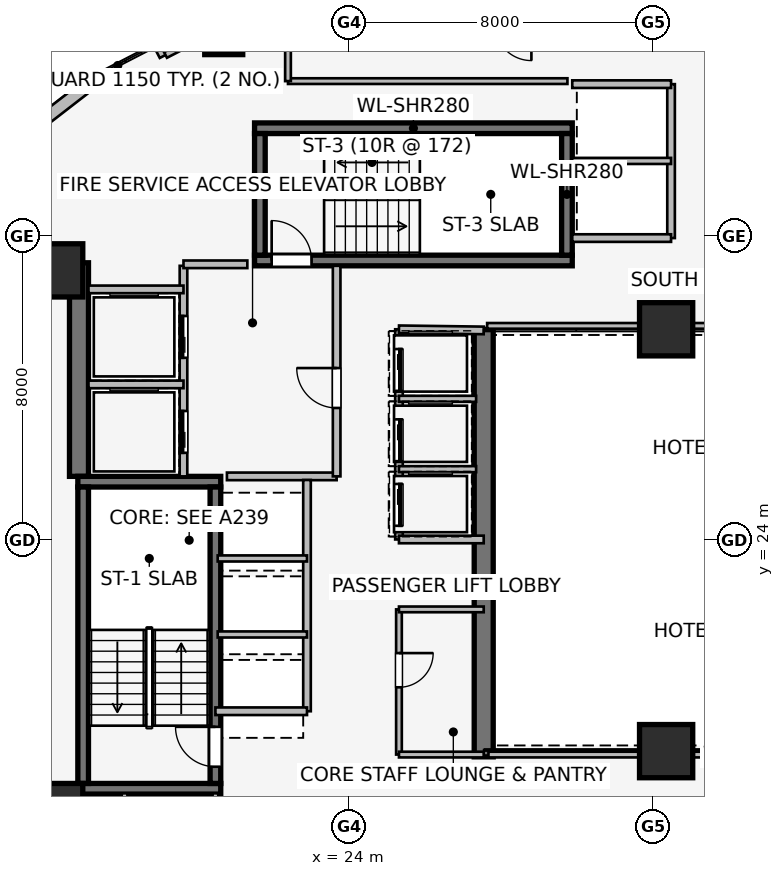
"""IFC4 building model, lengths in metres.
Left out: names, types, materials, properties, quantities, classifications, styles, units other than length and angle.
Written with IfcOpenShell. Run it as: python <this file> out.ifc"""

import sys

from ifc_helpers import new_model, si_unit, direction, frame, frame_2d, origin, origin_2d, place, context, subcontext, project, spatial, rectangle, extrude, element, fill, save


model = new_model("IFC4")
c1 = context("Model", 3, precision=1e-05, world=origin(), true_north=direction((0.0, 1.0)))
c2 = subcontext(c1, "Body", "Model", "MODEL_VIEW")
j1 = project(units=[si_unit("LENGTHUNIT", "METRE"), si_unit("PLANEANGLEUNIT", "RADIAN")], contexts=[c1])
p1 = place(None, origin())
s1 = spatial("IfcSite", under=j1, at=p1, CompositionType="ELEMENT")
p2 = place(p1, origin())
s2 = spatial("IfcBuilding", under=s1, at=p2, CompositionType="ELEMENT")
p3 = place(p2, frame((0.0, 0.0, 139.5)))
s3 = spatial("IfcBuildingStorey", under=s2, at=p3, CompositionType="ELEMENT", Elevation=139.5)
p4 = place(p3, frame((16.9, 25.68, 0.0), z_axis=(0.0, 0.0, 1.0), x_axis=(0.0, 1.0, 0.0)))
e1 = element("IfcWall", 1, at=p4, inside=s3, PredefinedType="SHEAR", context=c2, shape_type="SweptSolid", body=[
    extrude(rectangle(XDim=5.62, YDim=0.5, at=frame_2d((2.81, 0.0))), origin(), (0.0, 0.0, 1.0), 3.45),
])
p5 = place(p3, frame((27.55, 29.55, 0.0), z_axis=(0.0, 0.0, 1.0), x_axis=(0.0, -1.0, 0.0)))
e2 = element("IfcWall", 2, at=p5, inside=s3, PredefinedType="SHEAR", context=c2, shape_type="SweptSolid", body=[
    extrude(rectangle(XDim=11.25, YDim=0.5, at=frame_2d((5.625, 0.0))), origin(), (0.0, 0.0, 1.0), 3.45),
])
for number, where, z_axis, x_axis in (
    (3, (16.87, 17.46, 0.0), (0.0, 0.0, 1.0), (1.0, 0.0, 0.0)),
    (4, (20.63, 25.54, 0.0), (0.0, 0.0, 1.0), (-1.0, 0.0, 0.0)),
):
    element("IfcWall", number, at=place(p3, frame(where, z_axis=z_axis, x_axis=x_axis)), inside=s3, PredefinedType="SHEAR", context=c2, shape_type="SweptSolid", body=[
        extrude(rectangle(XDim=3.76, YDim=0.28, at=frame_2d((1.88, 0.0))), origin(), (0.0, 0.0, 1.0), 3.45),
    ])
p6 = place(p3, frame((17.01, 25.4, 0.0), z_axis=(0.0, 0.0, 1.0), x_axis=(0.0, -1.0, 0.0)))
e5 = element("IfcWall", 5, at=p6, inside=s3, PredefinedType="SHEAR", context=c2, shape_type="SweptSolid", body=[
    extrude(rectangle(XDim=7.8, YDim=0.28, at=frame_2d((3.9, 0.0))), origin(), (0.0, 0.0, 1.0), 3.45),
])
p7 = place(p3, frame((20.49, 17.6, 0.0), z_axis=(0.0, 0.0, 1.0), x_axis=(0.0, 1.0, 0.0)))
e6 = element("IfcWall", 6, at=p7, inside=s3, PredefinedType="SHEAR", context=c2, shape_type="SweptSolid", body=[
    extrude(rectangle(XDim=7.8, YDim=0.28, at=frame_2d((3.9, 0.0))), origin(), (0.0, 0.0, 1.0), 3.45),
])
p8 = place(p7, frame((0.44, 0.0, 0.0)))
e7 = element("IfcOpeningElement", 7, at=p8, cuts=e6, PredefinedType="OPENING", context=c2, shape_type="SweptSolid", body=[
    extrude(rectangle(XDim=1.05, YDim=2.0, at=frame_2d((0.525, 1.0))), frame((0.0, 0.15, 0.0), z_axis=(0.0, -1.0, 0.0), x_axis=(1.0, 0.0, 0.0)), (0.0, 0.0, 1.0), 0.3),
])
p9 = place(p3, frame((21.52, 31.36, 0.0), z_axis=(0.0, 0.0, 1.0), x_axis=(1.0, 0.0, 0.0)))
e8 = element("IfcWall", 8, at=p9, inside=s3, PredefinedType="SHEAR", context=c2, shape_type="SweptSolid", body=[
    extrude(rectangle(XDim=8.36, YDim=0.28, at=frame_2d((4.18, 0.0))), origin(), (0.0, 0.0, 1.0), 3.45),
])
p10 = place(p9, frame((0.45, 0.0, 0.0)))
e9 = element("IfcOpeningElement", 9, at=p10, cuts=e8, PredefinedType="OPENING", context=c2, shape_type="SweptSolid", body=[
    extrude(rectangle(XDim=1.05, YDim=2.0, at=frame_2d((0.525, 1.0))), frame((0.0, 0.15, 0.0), z_axis=(0.0, -1.0, 0.0), x_axis=(1.0, 0.0, 0.0)), (0.0, 0.0, 1.0), 0.3),
])
p11 = place(p3, frame((29.88, 34.84, 0.0), z_axis=(0.0, 0.0, 1.0), x_axis=(-1.0, 0.0, 0.0)))
e10 = element("IfcWall", 10, at=p11, inside=s3, PredefinedType="SHEAR", context=c2, shape_type="SweptSolid", body=[
    extrude(rectangle(XDim=8.36, YDim=0.28, at=frame_2d((4.18, 0.0))), origin(), (0.0, 0.0, 1.0), 3.45),
])
for number, where, z_axis, x_axis in (
    (11, (21.66, 34.7, 0.0), (0.0, 0.0, 1.0), (0.0, -1.0, 0.0)),
    (12, (29.74, 31.5, 0.0), (0.0, 0.0, 1.0), (0.0, 1.0, 0.0)),
):
    element("IfcWall", number, at=place(p3, frame(where, z_axis=z_axis, x_axis=x_axis)), inside=s3, PredefinedType="SHEAR", context=c2, shape_type="SweptSolid", body=[
        extrude(rectangle(XDim=3.2, YDim=0.28, at=frame_2d((1.6, 0.0))), origin(), (0.0, 0.0, 1.0), 3.45),
    ])
for number, where, z_axis, x_axis in (
    (13, (16.3, 16.9, 0.0), (0.0, 0.0, 1.0), (1.0, 0.0, 0.0)),
    (14, (16.3, 31.1, 0.0), (0.0, 0.0, 1.0), (1.0, 0.0, 0.0)),
    (15, (32.35, 18.45, 0.0), (0.0, 0.0, 1.0), (1.0, 0.0, 0.0)),
    (16, (32.35, 29.55, 0.0), (0.0, 0.0, 1.0), (1.0, 0.0, 0.0)),
):
    element("IfcColumn", number, at=place(p3, frame(where, z_axis=z_axis, x_axis=x_axis)), inside=s3, PredefinedType="COLUMN", context=c2, shape_type="SweptSolid", body=[
        extrude(rectangle(XDim=1.4, YDim=1.4, at=origin_2d()), origin(), (0.0, 0.0, 1.0), 3.45),
    ])
p12 = place(p3, frame((20.709, 37.277, 0.0), z_axis=(0.0, 0.0, 1.0), x_axis=(1.0, 0.0, 0.0)))
e17 = element("IfcColumn", 17, at=p12, inside=s3, PredefinedType="COLUMN", context=c2, shape_type="SweptSolid", body=[
    extrude(rectangle(XDim=1.0, YDim=1.0, at=origin_2d()), origin(), (0.0, 0.0, 1.0), 3.45),
])
p13 = place(p3, frame((19.177, 36.767, 0.0), z_axis=(0.0, 0.0, 1.0), x_axis=(-0.458658947762, 0.88861238436, 0.0)))
e18 = element("IfcWall", 18, at=p13, inside=s3, PredefinedType="STANDARD", context=c2, shape_type="SweptSolid", body=[
    extrude(rectangle(XDim=19.4, YDim=0.34, at=frame_2d((9.7, 0.0))), origin(), (0.0, 0.0, 1.0), 3.16),
])
p14 = place(p13, frame((2.8, 0.0, 0.75)))
e19 = element("IfcOpeningElement", 19, at=p14, cuts=e18, PredefinedType="OPENING", context=c2, shape_type="SweptSolid", body=[
    extrude(rectangle(XDim=1.6, YDim=1.55, at=frame_2d((0.8, 0.775))), frame((0.0, 0.18, 0.0), z_axis=(0.0, -1.0, 0.0), x_axis=(1.0, 0.0, 0.0)), (0.0, 0.0, 1.0), 0.36),
])
p15 = place(p13, frame((8.9, 0.0, 0.75)))
e20 = element("IfcOpeningElement", 20, at=p15, cuts=e18, PredefinedType="OPENING", context=c2, shape_type="SweptSolid", body=[
    extrude(rectangle(XDim=1.6, YDim=1.55, at=frame_2d((0.8, 0.775))), frame((0.0, 0.18, 0.0), z_axis=(0.0, -1.0, 0.0), x_axis=(1.0, 0.0, 0.0)), (0.0, 0.0, 1.0), 0.36),
])
p16 = place(p13, frame((15.0, 0.0, 0.75)))
e21 = element("IfcOpeningElement", 21, at=p16, cuts=e18, PredefinedType="OPENING", context=c2, shape_type="SweptSolid", body=[
    extrude(rectangle(XDim=1.6, YDim=1.55, at=frame_2d((0.8, 0.775))), frame((0.0, 0.18, 0.0), z_axis=(0.0, -1.0, 0.0), x_axis=(1.0, 0.0, 0.0)), (0.0, 0.0, 1.0), 0.36),
])
p17 = place(p3, frame((15.918, 35.024, 0.0), z_axis=(0.0, 0.0, 1.0), x_axis=(0.790621329885, 0.612305408053, 0.0)))
e22 = element("IfcWall", 22, at=p17, inside=s3, PredefinedType="STANDARD", context=c2, shape_type="SweptSolid", body=[
    extrude(rectangle(XDim=1.676, YDim=0.33, at=frame_2d((0.838, 0.0))), origin(), (0.0, 0.0, 1.0), 3.16),
])
p18 = place(p3, frame((19.65, 25.68, 0.0), z_axis=(0.0, 0.0, 1.0), x_axis=(0.0, 1.0, 0.0)))
e23 = element("IfcWall", 23, at=p18, inside=s3, PredefinedType="PARTITIONING", context=c2, shape_type="SweptSolid", body=[
    extrude(rectangle(XDim=5.54, YDim=0.2, at=frame_2d((2.77, 0.0))), origin(), (0.0, 0.0, 1.0), 3.16),
])
p19 = place(p18, frame((0.62, 0.0, 0.0)))
e24 = element("IfcOpeningElement", 24, at=p19, cuts=e23, PredefinedType="OPENING", context=c2, shape_type="SweptSolid", body=[
    extrude(rectangle(XDim=1.1, YDim=2.2, at=frame_2d((0.55, 1.1))), frame((0.0, 0.11, 0.0), z_axis=(0.0, -1.0, 0.0), x_axis=(1.0, 0.0, 0.0)), (0.0, 0.0, 1.0), 0.22),
])
p20 = place(p18, frame((3.12, 0.0, 0.0)))
e25 = element("IfcOpeningElement", 25, at=p20, cuts=e23, PredefinedType="OPENING", context=c2, shape_type="SweptSolid", body=[
    extrude(rectangle(XDim=1.1, YDim=2.2, at=frame_2d((0.55, 1.1))), frame((0.0, 0.11, 0.0), z_axis=(0.0, -1.0, 0.0), x_axis=(1.0, 0.0, 0.0)), (0.0, 0.0, 1.0), 0.22),
])
p21 = place(p3, frame((20.793, 25.68, 0.0), z_axis=(0.0, 0.0, 1.0), x_axis=(1.0, 0.0, 0.0)))
e26 = element("IfcWall", 26, at=p21, inside=s3, PredefinedType="PARTITIONING", context=c2, shape_type="SweptSolid", body=[
    extrude(rectangle(XDim=2.887, YDim=0.2, at=frame_2d((1.443, 0.0))), origin(), (0.0, 0.0, 1.0), 3.16),
])
p22 = place(p3, frame((23.68, 25.68, 0.0), z_axis=(0.0, 0.0, 1.0), x_axis=(0.0, 1.0, 0.0)))
e27 = element("IfcWall", 27, at=p22, inside=s3, PredefinedType="PARTITIONING", context=c2, shape_type="SweptSolid", body=[
    extrude(rectangle(XDim=5.54, YDim=0.2, at=frame_2d((2.77, 0.0))), origin(), (0.0, 0.0, 1.0), 3.16),
])
p23 = place(p22, frame((1.8, 0.0, 0.0)))
e28 = element("IfcOpeningElement", 28, at=p23, cuts=e27, PredefinedType="OPENING", context=c2, shape_type="SweptSolid", body=[
    extrude(rectangle(XDim=1.05, YDim=2.0, at=frame_2d((0.525, 1.0))), frame((0.0, 0.11, 0.0), z_axis=(0.0, -1.0, 0.0), x_axis=(1.0, 0.0, 0.0)), (0.0, 0.0, 1.0), 0.22),
])
p24 = place(p3, frame((21.33, 31.26, 0.0), z_axis=(0.0, 0.0, 1.0), x_axis=(-1.0, 0.0, 0.0)))
e29 = element("IfcWall", 29, at=p24, inside=s3, PredefinedType="PARTITIONING", context=c2, shape_type="SweptSolid", body=[
    extrude(rectangle(XDim=1.68, YDim=0.2, at=frame_2d((0.84, 0.0))), origin(), (0.0, 0.0, 1.0), 3.16),
])
p25 = place(p3, frame((17.15, 28.1, 0.0), z_axis=(0.0, 0.0, 1.0), x_axis=(1.0, 0.0, 0.0)))
e30 = element("IfcWall", 30, at=p25, inside=s3, PredefinedType="PARTITIONING", context=c2, shape_type="SweptSolid", body=[
    extrude(rectangle(XDim=2.5, YDim=0.2, at=frame_2d((1.25, 0.0))), origin(), (0.0, 0.0, 1.0), 3.16),
])
p26 = place(p3, frame((19.65, 30.6, 0.0), z_axis=(0.0, 0.0, 1.0), x_axis=(-1.0, 0.0, 0.0)))
e31 = element("IfcWall", 31, at=p26, inside=s3, PredefinedType="PARTITIONING", context=c2, shape_type="SweptSolid", body=[
    extrude(rectangle(XDim=2.5, YDim=0.2, at=frame_2d((1.25, 0.0))), origin(), (0.0, 0.0, 1.0), 2.06),
])
p27 = place(p3, frame((32.48, 31.95, 0.0), z_axis=(0.0, 0.0, 1.0), x_axis=(0.0, 1.0, 0.0)))
e32 = element("IfcWall", 32, at=p27, inside=s3, PredefinedType="PARTITIONING", context=c2, shape_type="SweptSolid", body=[
    extrude(rectangle(XDim=4.05, YDim=0.2, at=frame_2d((2.025, 0.0))), origin(), (0.0, 0.0, 1.0), 3.16),
])
p28 = place(p3, frame((29.88, 36.0, 0.0), z_axis=(0.0, 0.0, 1.0), x_axis=(1.0, 0.0, 0.0)))
e33 = element("IfcWall", 33, at=p28, inside=s3, PredefinedType="PARTITIONING", context=c2, shape_type="SweptSolid", body=[
    extrude(rectangle(XDim=2.6, YDim=0.2, at=frame_2d((1.3, 0.0))), origin(), (0.0, 0.0, 1.0), 2.552),
])
p29 = place(p3, frame((32.48, 31.95, 0.0), z_axis=(0.0, 0.0, 1.0), x_axis=(-1.0, 0.0, 0.0)))
e34 = element("IfcWall", 34, at=p29, inside=s3, PredefinedType="PARTITIONING", context=c2, shape_type="SweptSolid", body=[
    extrude(rectangle(XDim=2.6, YDim=0.2, at=frame_2d((1.3, 0.0))), origin(), (0.0, 0.0, 1.0), 3.16),
])
p30 = place(p3, frame((29.875, 33.98, 0.0), z_axis=(0.0, 0.0, 1.0), x_axis=(1.0, 0.0, 0.0)))
e35 = element("IfcWall", 35, at=p30, inside=s3, PredefinedType="PARTITIONING", context=c2, shape_type="SweptSolid", body=[
    extrude(rectangle(XDim=2.605, YDim=0.16, at=frame_2d((1.302, 0.0))), origin(), (0.0, 0.0, 1.0), 3.16),
])
p31 = place(p3, frame((22.9, 19.5, 0.0), z_axis=(0.0, 0.0, 1.0), x_axis=(0.0, 1.0, 0.0)))
e36 = element("IfcWall", 36, at=p31, inside=s3, PredefinedType="PARTITIONING", context=c2, shape_type="SweptSolid", body=[
    extrude(rectangle(XDim=6.085, YDim=0.2, at=frame_2d((3.042, 0.0))), origin(), (0.0, 0.0, 1.0), 3.16),
])
p32 = place(p3, frame((20.49, 19.5, 0.0), z_axis=(0.0, 0.0, 1.0), x_axis=(1.0, 0.0, 0.0)))
e37 = element("IfcWall", 37, at=p32, inside=s3, PredefinedType="PARTITIONING", context=c2, shape_type="SweptSolid", body=[
    extrude(rectangle(XDim=2.41, YDim=0.2, at=frame_2d((1.205, 0.0))), origin(), (0.0, 0.0, 1.0), 2.06),
])
for number, where, z_axis, x_axis in (
    (38, (20.55, 21.52, 0.0), (0.0, 0.0, 1.0), (1.0, 0.0, 0.0)),
    (39, (20.55, 23.52, 0.0), (0.0, 0.0, 1.0), (1.0, 0.0, 0.0)),
):
    element("IfcWall", number, at=place(p3, frame(where, z_axis=z_axis, x_axis=x_axis)), inside=s3, PredefinedType="PARTITIONING", context=c2, shape_type="SweptSolid", body=[
        extrude(rectangle(XDim=2.35, YDim=0.16, at=frame_2d((1.175, 0.0))), origin(), (0.0, 0.0, 1.0), 3.16),
    ])
p33 = place(p3, frame((25.32, 29.55, 0.0), z_axis=(0.0, 0.0, 1.0), x_axis=(0.0, -1.0, 0.0)))
e40 = element("IfcWall", 40, at=p33, inside=s3, PredefinedType="PARTITIONING", context=c2, shape_type="SweptSolid", body=[
    extrude(rectangle(XDim=5.53, YDim=0.2, at=frame_2d((2.765, 0.0))), origin(), (0.0, 0.0, 1.0), 3.16),
])
p34 = place(p33, frame((0.52, 0.0, 0.0)))
e41 = element("IfcOpeningElement", 41, at=p34, cuts=e40, PredefinedType="OPENING", context=c2, shape_type="SweptSolid", body=[
    extrude(rectangle(XDim=1.1, YDim=2.2, at=frame_2d((0.55, 1.1))), frame((0.0, 0.11, 0.0), z_axis=(0.0, -1.0, 0.0), x_axis=(1.0, 0.0, 0.0)), (0.0, 0.0, 1.0), 0.22),
])
p35 = place(p33, frame((2.37, 0.0, 0.0)))
e42 = element("IfcOpeningElement", 42, at=p35, cuts=e40, PredefinedType="OPENING", context=c2, shape_type="SweptSolid", body=[
    extrude(rectangle(XDim=1.1, YDim=2.2, at=frame_2d((0.55, 1.1))), frame((0.0, 0.11, 0.0), z_axis=(0.0, -1.0, 0.0), x_axis=(1.0, 0.0, 0.0)), (0.0, 0.0, 1.0), 0.22),
])
p36 = place(p33, frame((4.07, 0.0, 0.0)))
e43 = element("IfcOpeningElement", 43, at=p36, cuts=e40, PredefinedType="OPENING", context=c2, shape_type="SweptSolid", body=[
    extrude(rectangle(XDim=1.1, YDim=2.2, at=frame_2d((0.55, 1.1))), frame((0.0, 0.11, 0.0), z_axis=(0.0, -1.0, 0.0), x_axis=(1.0, 0.0, 0.0)), (0.0, 0.0, 1.0), 0.22),
])
p37 = place(p3, frame((27.55, 29.52, 0.0), z_axis=(0.0, 0.0, 1.0), x_axis=(-0.999909343457, 0.013464949556, 0.0)))
e44 = element("IfcWall", 44, at=p37, inside=s3, PredefinedType="PARTITIONING", context=c2, shape_type="SweptSolid", body=[
    extrude(rectangle(XDim=2.23, YDim=0.2, at=frame_2d((1.115, 0.0))), origin(), (0.0, 0.0, 1.0), 2.06),
])
p38 = place(p3, frame((25.32, 24.02, 0.0), z_axis=(0.0, 0.0, 1.0), x_axis=(1.0, 0.0, 0.0)))
e45 = element("IfcWall", 45, at=p38, inside=s3, PredefinedType="PARTITIONING", context=c2, shape_type="SweptSolid", body=[
    extrude(rectangle(XDim=2.23, YDim=0.2, at=frame_2d((1.115, 0.0))), origin(), (0.0, 0.0, 1.0), 3.16),
])
for number, where, z_axis, x_axis in (
    (46, (25.32, 25.87, 0.0), (0.0, 0.0, 1.0), (1.0, 0.0, 0.0)),
    (47, (25.32, 27.72, 0.0), (0.0, 0.0, 1.0), (1.0, 0.0, 0.0)),
):
    element("IfcWall", number, at=place(p3, frame(where, z_axis=z_axis, x_axis=x_axis)), inside=s3, PredefinedType="PARTITIONING", context=c2, shape_type="SweptSolid", body=[
        extrude(rectangle(XDim=2.03, YDim=0.16, at=frame_2d((1.015, 0.0))), origin(), (0.0, 0.0, 1.0), 3.16),
    ])
p39 = place(p3, frame((25.32, 22.18, 0.0), z_axis=(0.0, 0.0, 1.0), x_axis=(0.0, -1.0, 0.0)))
e48 = element("IfcWall", 48, at=p39, inside=s3, PredefinedType="PARTITIONING", context=c2, shape_type="SweptSolid", body=[
    extrude(rectangle(XDim=3.82, YDim=0.15, at=frame_2d((1.91, 0.0))), origin(), (0.0, 0.0, 1.0), 3.16),
])
p40 = place(p39, frame((1.15, 0.0, 0.0)))
e49 = element("IfcOpeningElement", 49, at=p40, cuts=e48, PredefinedType="OPENING", context=c2, shape_type="SweptSolid", body=[
    extrude(rectangle(XDim=0.9, YDim=2.0, at=frame_2d((0.45, 1.0))), frame((0.0, 0.085, 0.0), z_axis=(0.0, -1.0, 0.0), x_axis=(1.0, 0.0, 0.0)), (0.0, 0.0, 1.0), 0.17),
])
for number, where, z_axis, x_axis in (
    (50, (25.32, 22.18, 0.0), (0.0, 0.0, 1.0), (1.0, 0.0, 0.0)),
    (51, (25.32, 18.36, 0.0), (0.0, 0.0, 1.0), (1.0, 0.0, 0.0)),
):
    element("IfcWall", number, at=place(p3, frame(where, z_axis=z_axis, x_axis=x_axis)), inside=s3, PredefinedType="PARTITIONING", context=c2, shape_type="SweptSolid", body=[
        extrude(rectangle(XDim=2.23, YDim=0.15, at=frame_2d((1.115, 0.0))), origin(), (0.0, 0.0, 1.0), 3.16),
    ])
p41 = place(p3, frame((18.1, 17.34, 0.0), z_axis=(0.0, 0.0, 1.0), x_axis=(0.0, -1.0, 0.0)))
e52 = element("IfcWall", 52, at=p41, inside=s3, PredefinedType="PARTITIONING", context=c2, shape_type="SweptSolid", body=[
    extrude(rectangle(XDim=4.14, YDim=0.15, at=frame_2d((2.07, 0.0))), origin(), (0.0, 0.0, 1.0), 3.16),
])
p42 = place(p3, frame((20.49, 13.2, 0.0), z_axis=(0.0, 0.0, 1.0), x_axis=(0.0, 1.0, 0.0)))
e53 = element("IfcWall", 53, at=p42, inside=s3, PredefinedType="PARTITIONING", context=c2, shape_type="SweptSolid", body=[
    extrude(rectangle(XDim=4.14, YDim=0.15, at=frame_2d((2.07, 0.0))), origin(), (0.0, 0.0, 1.0), 3.16),
])
p43 = place(p42, frame((0.45, 0.0, 0.0)))
e54 = element("IfcOpeningElement", 54, at=p43, cuts=e53, PredefinedType="OPENING", context=c2, shape_type="SweptSolid", body=[
    extrude(rectangle(XDim=0.86, YDim=2.0, at=frame_2d((0.43, 1.0))), frame((0.0, 0.085, 0.0), z_axis=(0.0, -1.0, 0.0), x_axis=(1.0, 0.0, 0.0)), (0.0, 0.0, 1.0), 0.17),
])
p44 = place(p42, frame((2.6, 0.0, 0.0)))
e55 = element("IfcOpeningElement", 55, at=p44, cuts=e53, PredefinedType="OPENING", context=c2, shape_type="SweptSolid", body=[
    extrude(rectangle(XDim=0.86, YDim=2.0, at=frame_2d((0.43, 1.0))), frame((0.0, 0.085, 0.0), z_axis=(0.0, -1.0, 0.0), x_axis=(1.0, 0.0, 0.0)), (0.0, 0.0, 1.0), 0.17),
])
p45 = place(p3, frame((27.675, 18.36, 0.0), z_axis=(0.0, 0.0, 1.0), x_axis=(1.0, 0.0, 0.0)))
e56 = element("IfcWall", 56, at=p45, inside=s3, PredefinedType="PARTITIONING", context=c2, shape_type="SweptSolid", body=[
    extrude(rectangle(XDim=12.165, YDim=0.15, at=frame_2d((6.083, 0.0))), origin(), (0.0, 0.0, 1.0), 2.301),
])
p46 = place(p3, frame((39.84, 29.64, 0.0), z_axis=(0.0, 0.0, 1.0), x_axis=(-1.0, 0.0, 0.0)))
e57 = element("IfcWall", 57, at=p46, inside=s3, PredefinedType="PARTITIONING", context=c2, shape_type="SweptSolid", body=[
    extrude(rectangle(XDim=12.2, YDim=0.15, at=frame_2d((6.1, 0.0))), origin(), (0.0, 0.0, 1.0), 2.301),
])
p47 = place(p3, frame((31.972, 43.372, 0.0), z_axis=(0.0, 0.0, 1.0), x_axis=(-0.888588109751, -0.458705974683, 0.0)))
e58 = element("IfcWall", 58, at=p47, inside=s3, PredefinedType="PARTITIONING", context=c2, shape_type="SweptSolid", body=[
    extrude(rectangle(XDim=14.399, YDim=0.165, at=frame_2d((7.2, 0.0))), origin(), (0.0, 0.0, 1.0), 2.532),
])
p48 = place(p47, frame((10.049, 0.0, 0.0)))
e59 = element("IfcOpeningElement", 59, at=p48, cuts=e58, PredefinedType="OPENING", context=c2, shape_type="SweptSolid", body=[
    extrude(rectangle(XDim=0.96, YDim=2.0, at=frame_2d((0.48, 1.0))), frame((0.0, 0.093, 0.0), z_axis=(0.0, -1.0, 0.0), x_axis=(1.0, 0.0, 0.0)), (0.0, 0.0, 1.0), 0.185),
])
p49 = place(p3, frame((29.753, 36.08, 0.0), z_axis=(0.0, 0.0, 1.0), x_axis=(-1.0, 0.0, 0.0)))
e60 = element("IfcWall", 60, at=p49, inside=s3, PredefinedType="PARTITIONING", context=c2, shape_type="SweptSolid", body=[
    extrude(rectangle(XDim=7.353, YDim=0.15, at=frame_2d((3.677, 0.0))), origin(), (0.0, 0.0, 1.0), 2.627),
])
p50 = place(p3, frame((22.4, 36.08, 0.0), z_axis=(0.0, 0.0, 1.0), x_axis=(0.0, 1.0, 0.0)))
e61 = element("IfcWall", 61, at=p50, inside=s3, PredefinedType="PARTITIONING", context=c2, shape_type="SweptSolid", body=[
    extrude(rectangle(XDim=1.43, YDim=0.15, at=frame_2d((0.715, 0.0))), origin(), (0.0, 0.0, 1.0), 3.16),
])
p51 = place(p8, origin())
e62 = element("IfcDoor", 62, at=p51, inside=s3, OperationType="SINGLE_SWING_RIGHT", PredefinedType="DOOR", context=c2, shape_type="SweptSolid", body=[
    extrude(rectangle(XDim=1.05, YDim=2.0, at=frame_2d((0.525, 1.0))), frame((0.0, 0.025, 0.0), z_axis=(0.0, -1.0, 0.0), x_axis=(1.0, 0.0, 0.0)), (0.0, 0.0, 1.0), 0.05),
])
fill(e7, e62)
p52 = place(p10, origin())
e63 = element("IfcDoor", 63, at=p52, inside=s3, OperationType="SINGLE_SWING_LEFT", PredefinedType="DOOR", context=c2, shape_type="SweptSolid", body=[
    extrude(rectangle(XDim=1.05, YDim=2.0, at=frame_2d((0.525, 1.0))), frame((0.0, 0.025, 0.0), z_axis=(0.0, -1.0, 0.0), x_axis=(1.0, 0.0, 0.0)), (0.0, 0.0, 1.0), 0.05),
])
fill(e9, e63)
p53 = place(p19, origin())
e64 = element("IfcDoor", 64, at=p53, inside=s3, OperationType="SLIDING_TO_LEFT", PredefinedType="DOOR", context=c2, shape_type="SweptSolid", body=[
    extrude(rectangle(XDim=1.1, YDim=2.2, at=frame_2d((0.55, 1.1))), frame((0.0, 0.025, 0.0), z_axis=(0.0, -1.0, 0.0), x_axis=(1.0, 0.0, 0.0)), (0.0, 0.0, 1.0), 0.05),
])
fill(e24, e64)
p54 = place(p20, origin())
e65 = element("IfcDoor", 65, at=p54, inside=s3, OperationType="SLIDING_TO_LEFT", PredefinedType="DOOR", context=c2, shape_type="SweptSolid", body=[
    extrude(rectangle(XDim=1.1, YDim=2.2, at=frame_2d((0.55, 1.1))), frame((0.0, 0.025, 0.0), z_axis=(0.0, -1.0, 0.0), x_axis=(1.0, 0.0, 0.0)), (0.0, 0.0, 1.0), 0.05),
])
fill(e25, e65)
p55 = place(p23, origin())
e66 = element("IfcDoor", 66, at=p55, inside=s3, OperationType="SINGLE_SWING_RIGHT", PredefinedType="DOOR", context=c2, shape_type="SweptSolid", body=[
    extrude(rectangle(XDim=1.05, YDim=2.0, at=frame_2d((0.525, 1.0))), frame((0.0, 0.025, 0.0), z_axis=(0.0, -1.0, 0.0), x_axis=(1.0, 0.0, 0.0)), (0.0, 0.0, 1.0), 0.05),
])
fill(e28, e66)
p56 = place(p34, origin())
e67 = element("IfcDoor", 67, at=p56, inside=s3, OperationType="SLIDING_TO_LEFT", PredefinedType="DOOR", context=c2, shape_type="SweptSolid", body=[
    extrude(rectangle(XDim=1.1, YDim=2.2, at=frame_2d((0.55, 1.1))), frame((0.0, 0.025, 0.0), z_axis=(0.0, -1.0, 0.0), x_axis=(1.0, 0.0, 0.0)), (0.0, 0.0, 1.0), 0.05),
])
fill(e41, e67)
p57 = place(p35, origin())
e68 = element("IfcDoor", 68, at=p57, inside=s3, OperationType="SLIDING_TO_LEFT", PredefinedType="DOOR", context=c2, shape_type="SweptSolid", body=[
    extrude(rectangle(XDim=1.1, YDim=2.2, at=frame_2d((0.55, 1.1))), frame((0.0, 0.025, 0.0), z_axis=(0.0, -1.0, 0.0), x_axis=(1.0, 0.0, 0.0)), (0.0, 0.0, 1.0), 0.05),
])
fill(e42, e68)
p58 = place(p36, origin())
e69 = element("IfcDoor", 69, at=p58, inside=s3, OperationType="SLIDING_TO_LEFT", PredefinedType="DOOR", context=c2, shape_type="SweptSolid", body=[
    extrude(rectangle(XDim=1.1, YDim=2.2, at=frame_2d((0.55, 1.1))), frame((0.0, 0.025, 0.0), z_axis=(0.0, -1.0, 0.0), x_axis=(1.0, 0.0, 0.0)), (0.0, 0.0, 1.0), 0.05),
])
fill(e43, e69)
p59 = place(p40, origin())
e70 = element("IfcDoor", 70, at=p59, inside=s3, OperationType="SINGLE_SWING_LEFT", PredefinedType="DOOR", context=c2, shape_type="SweptSolid", body=[
    extrude(rectangle(XDim=0.9, YDim=2.0, at=frame_2d((0.45, 1.0))), frame((0.0, 0.025, 0.0), z_axis=(0.0, -1.0, 0.0), x_axis=(1.0, 0.0, 0.0)), (0.0, 0.0, 1.0), 0.05),
])
fill(e49, e70)
save(model, sys.argv[1])
